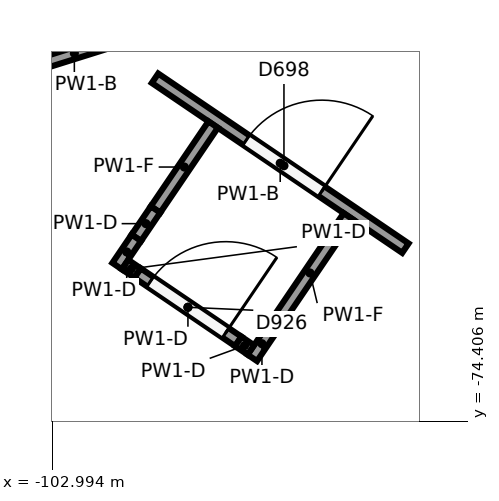
"""IFC4 building model, lengths in metres.
Left out: names, types, materials, properties, quantities, classifications, styles, units other than length and angle.
Written with IfcOpenShell. Run it as: python <this file> out.ifc"""

import sys

from ifc_helpers import new_model, si_unit, direction, frame, frame_2d, origin, origin_2d, place, context, subcontext, project, spatial, rectangle, circle, extrude, element, fill, save


model = new_model("IFC4")
c1 = context("Model", 3, precision=1e-05, world=origin(), true_north=direction((0.0, 1.0)))
c2 = subcontext(c1, "Body", "Model", "MODEL_VIEW")
j1 = project(units=[si_unit("LENGTHUNIT", "METRE"), si_unit("PLANEANGLEUNIT", "RADIAN")], contexts=[c1])
p1 = place(None, origin())
s1 = spatial("IfcSite", under=j1, at=p1, CompositionType="ELEMENT")
p2 = place(p1, origin())
s2 = spatial("IfcBuilding", under=s1, at=p2, CompositionType="ELEMENT")
p3 = place(p2, frame((0.0, 0.0, 6.5)))
s3 = spatial("IfcBuildingStorey", under=s2, at=p3, CompositionType="ELEMENT", Elevation=6.5)
p4 = place(p3, frame((-101.14, -69.294, 0.0), z_axis=(0.0, 0.0, 1.0), x_axis=(1.0, 0.0, 0.0)))
e1 = element("IfcColumn", 1, at=p4, inside=s3, PredefinedType="COLUMN", context=c2, shape_type="SweptSolid", body=[
    extrude(circle(Radius=0.4, at=origin_2d()), origin(), (0.0, 0.0, 1.0), 5.5),
])
p5 = place(p3, frame((-102.051, -69.36, 0.0), z_axis=(0.0, 0.0, 1.0), x_axis=(-0.954243765566, -0.299029824395, 0.0)))
e2 = element("IfcWall", 2, at=p5, inside=s3, PredefinedType="PARTITIONING", context=c2, shape_type="SweptSolid", body=[
    extrude(rectangle(XDim=1.363, YDim=0.15, at=frame_2d((0.681, 0.0))), origin(), (0.0, 0.0, 1.0), 5.05),
])
p6 = place(p3, frame((-101.639, -69.893, 0.0), z_axis=(0.0, 0.0, 1.0), x_axis=(0.82747475675, -0.561502918017, 0.0)))
e3 = element("IfcWall", 3, at=p6, inside=s3, PredefinedType="PARTITIONING", context=c2, shape_type="SweptSolid", body=[
    extrude(rectangle(XDim=3.981, YDim=0.15, at=frame_2d((1.99, 0.0))), origin(), (0.0, 0.0, 1.0), 5.05),
])
p7 = place(p6, frame((1.45, 0.0, 0.0)))
e4 = element("IfcOpeningElement", 4, at=p7, cuts=e3, PredefinedType="OPENING", context=c2, shape_type="SweptSolid", body=[
    extrude(rectangle(XDim=1.2, YDim=2.1, at=frame_2d((0.6, 1.05))), frame((0.0, 0.085, 0.0), z_axis=(0.0, -1.0, 0.0), x_axis=(1.0, 0.0, 0.0)), (0.0, 0.0, 1.0), 0.17),
])
p8 = place(p3, frame((-100.875, -70.502, 0.0), z_axis=(0.0, 0.0, 1.0), x_axis=(-0.561567757892, -0.827430754382, 0.0)))
e5 = element("IfcWall", 5, at=p8, inside=s3, PredefinedType="PARTITIONING", context=c2, shape_type="SweptSolid", body=[
    extrude(rectangle(XDim=1.35, YDim=0.15, at=frame_2d((0.675, 0.0))), origin(), (0.0, 0.0, 1.0), 5.1),
])
p9 = place(p3, frame((-101.633, -71.619, 0.0), z_axis=(0.0, 0.0, 1.0), x_axis=(-0.561315731762, -0.827601745574, 0.0)))
e6 = element("IfcWall", 6, at=p9, inside=s3, PredefinedType="PARTITIONING", context=c2, shape_type="SweptSolid", body=[
    extrude(rectangle(XDim=0.45, YDim=0.15, at=frame_2d((0.225, 0.0))), origin(), (0.0, 0.0, 1.0), 3.85),
])
p10 = place(p3, frame((-101.885, -71.992, 0.0), z_axis=(0.0, 0.0, 1.0), x_axis=(-0.561567757892, -0.827430754382, 0.0)))
e7 = element("IfcWall", 7, at=p10, inside=s3, PredefinedType="PARTITIONING", context=c2, shape_type="SweptSolid", body=[
    extrude(rectangle(XDim=0.45, YDim=0.15, at=frame_2d((0.225, 0.0))), origin(), (0.0, 0.0, 1.0), 3.85),
])
p11 = place(p3, frame((-99.096, -71.709, 0.0), z_axis=(0.0, 0.0, 1.0), x_axis=(-0.561504735028, -0.82747352377, 0.0)))
e8 = element("IfcWall", 8, at=p11, inside=s3, PredefinedType="PARTITIONING", context=c2, shape_type="SweptSolid", body=[
    extrude(rectangle(XDim=1.8, YDim=0.15, at=frame_2d((0.9, 0.0))), origin(), (0.0, 0.0, 1.0), 5.1),
])
p12 = place(p3, frame((-100.106, -73.199, 0.0), z_axis=(0.0, 0.0, 1.0), x_axis=(-0.561315731762, -0.827601745574, 0.0)))
e9 = element("IfcWall", 9, at=p12, inside=s3, PredefinedType="PARTITIONING", context=c2, shape_type="SweptSolid", body=[
    extrude(rectangle(XDim=0.45, YDim=0.15, at=frame_2d((0.225, 0.0))), origin(), (0.0, 0.0, 1.0), 3.85),
])
p13 = place(p3, frame((-102.034, -72.344, 0.0), z_axis=(0.0, 0.0, 1.0), x_axis=(0.827516278761, -0.561441723053, 0.0)))
e10 = element("IfcWall", 10, at=p13, inside=s3, PredefinedType="PARTITIONING", context=c2, shape_type="SweptSolid", body=[
    extrude(rectangle(XDim=0.2, YDim=0.15, at=frame_2d((0.1, 0.0))), origin(), (0.0, 0.0, 1.0), 3.85),
])
p14 = place(p3, frame((-101.868, -72.456, 0.0), z_axis=(0.0, 0.0, 1.0), x_axis=(0.827468178384, -0.561512612291, 0.0)))
e11 = element("IfcWall", 11, at=p14, inside=s3, PredefinedType="PARTITIONING", context=c2, shape_type="SweptSolid", body=[
    extrude(rectangle(XDim=1.6, YDim=0.15, at=frame_2d((0.8, 0.0))), origin(), (0.0, 0.0, 1.0), 3.85),
])
p15 = place(p14, frame((0.2, 0.0, 0.0)))
e12 = element("IfcOpeningElement", 12, at=p15, cuts=e11, PredefinedType="OPENING", context=c2, shape_type="SweptSolid", body=[
    extrude(rectangle(XDim=1.2, YDim=2.1, at=frame_2d((0.6, 1.05))), frame((0.0, 0.085, 0.0), z_axis=(0.0, -1.0, 0.0), x_axis=(1.0, 0.0, 0.0)), (0.0, 0.0, 1.0), 0.17),
])
p16 = place(p3, frame((-100.544, -73.355, 0.0), z_axis=(0.0, 0.0, 1.0), x_axis=(0.827516278761, -0.561441723053, 0.0)))
e13 = element("IfcWall", 13, at=p16, inside=s3, PredefinedType="PARTITIONING", context=c2, shape_type="SweptSolid", body=[
    extrude(rectangle(XDim=0.2, YDim=0.15, at=frame_2d((0.1, 0.0))), origin(), (0.0, 0.0, 1.0), 3.85),
])
p17 = place(p7, origin())
e14 = element("IfcDoor", 14, at=p17, inside=s3, OperationType="SINGLE_SWING_RIGHT", PredefinedType="DOOR", context=c2, shape_type="SweptSolid", body=[
    extrude(rectangle(XDim=1.2, YDim=2.1, at=frame_2d((0.6, 1.05))), frame((0.0, 0.025, 0.0), z_axis=(0.0, -1.0, 0.0), x_axis=(1.0, 0.0, 0.0)), (0.0, 0.0, 1.0), 0.05),
])
fill(e4, e14)
p18 = place(p15, origin())
e15 = element("IfcDoor", 15, at=p18, inside=s3, OperationType="SINGLE_SWING_RIGHT", PredefinedType="DOOR", context=c2, shape_type="SweptSolid", body=[
    extrude(rectangle(XDim=1.2, YDim=2.1, at=frame_2d((0.6, 1.05))), frame((0.0, 0.025, 0.0), z_axis=(0.0, -1.0, 0.0), x_axis=(1.0, 0.0, 0.0)), (0.0, 0.0, 1.0), 0.05),
])
fill(e12, e15)
save(model, sys.argv[1])
